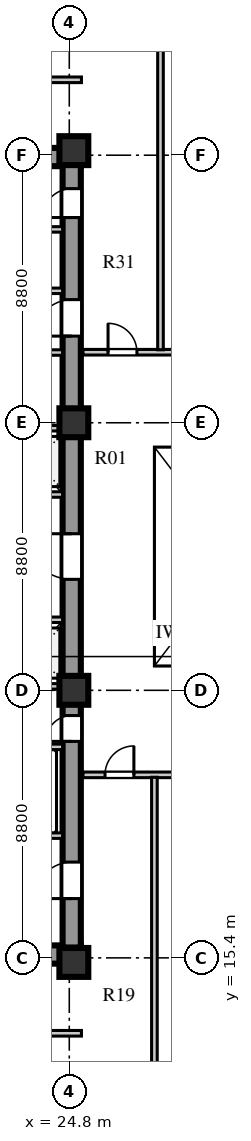
"""IFC4 building model, lengths in metres.
Left out: names, types, materials, properties, quantities, classifications, styles, units other than length and angle.
Written with IfcOpenShell. Run it as: python <this file> out.ifc"""

import sys

from ifc_helpers import new_model, si_unit, direction, frame, frame_2d, origin, origin_2d, place, context, subcontext, project, spatial, rectangle, extrude, element, fill, save


model = new_model("IFC4")
c1 = context("Model", 3, precision=1e-05, world=origin(), true_north=direction((0.0, 1.0)))
c2 = subcontext(c1, "Body", "Model", "MODEL_VIEW")
j1 = project(units=[si_unit("LENGTHUNIT", "METRE"), si_unit("PLANEANGLEUNIT", "RADIAN")], contexts=[c1])
p1 = place(None, origin())
s1 = spatial("IfcSite", under=j1, at=p1, CompositionType="ELEMENT")
p2 = place(p1, origin())
s2 = spatial("IfcBuilding", under=s1, at=p2, CompositionType="ELEMENT")
p3 = place(p2, frame((0.0, 0.0, 82.0)))
s3 = spatial("IfcBuildingStorey", under=s2, at=p3, CompositionType="ELEMENT", Elevation=82.0)
for number, where, z_axis, x_axis in (
    (1, (15.3, 15.51, 0.0), (0.0, 0.0, 1.0), (1.0, 0.0, 0.0)),
    (2, (15.3, 41.74, 0.0), (0.0, 0.0, 1.0), (1.0, 0.0, 0.0)),
):
    element("IfcWall", number, at=place(p3, frame(where, z_axis=z_axis, x_axis=x_axis)), inside=s3, PredefinedType="SHEAR", context=c2, shape_type="SweptSolid", body=[
        extrude(rectangle(XDim=9.88, YDim=0.6, at=frame_2d((4.94, 0.0))), origin(), (0.0, 0.0, 1.0), 3.74),
    ])
p4 = place(p3, frame((24.88, 15.74, 0.0), z_axis=(0.0, 0.0, 1.0), x_axis=(0.0, 1.0, 0.0)))
e3 = element("IfcWall", 3, at=p4, inside=s3, PredefinedType="SHEAR", context=c2, shape_type="SweptSolid", body=[
    extrude(rectangle(XDim=25.76, YDim=0.6, at=frame_2d((12.88, 0.0))), origin(), (0.0, 0.0, 1.0), 3.74),
])
p5 = place(p4, frame((1.61, 0.0, 0.0)))
e4 = element("IfcOpeningElement", 4, at=p5, cuts=e3, PredefinedType="OPENING", context=c2, shape_type="SweptSolid", body=[
    extrude(rectangle(XDim=1.2, YDim=2.1, at=frame_2d((0.6, 1.05))), frame((0.0, 0.31, 0.0), z_axis=(0.0, -1.0, 0.0), x_axis=(1.0, 0.0, 0.0)), (0.0, 0.0, 1.0), 0.62),
])
p6 = place(p4, frame((6.78, 0.0, 0.0)))
e5 = element("IfcOpeningElement", 5, at=p6, cuts=e3, PredefinedType="OPENING", context=c2, shape_type="SweptSolid", body=[
    extrude(rectangle(XDim=0.85, YDim=2.06, at=frame_2d((0.425, 1.03))), frame((0.0, 0.31, 0.0), z_axis=(0.0, -1.0, 0.0), x_axis=(1.0, 0.0, 0.0)), (0.0, 0.0, 1.0), 0.62),
])
p7 = place(p4, frame((12.11, 0.0, 0.0)))
e6 = element("IfcOpeningElement", 6, at=p7, cuts=e3, PredefinedType="OPENING", context=c2, shape_type="SweptSolid", body=[
    extrude(rectangle(XDim=1.5, YDim=2.12, at=frame_2d((0.75, 1.06))), frame((0.0, 0.31, 0.0), z_axis=(0.0, -1.0, 0.0), x_axis=(1.0, 0.0, 0.0)), (0.0, 0.0, 1.0), 0.62),
])
p8 = place(p4, frame((20.11, 0.0, 0.0)))
e7 = element("IfcOpeningElement", 7, at=p8, cuts=e3, PredefinedType="OPENING", context=c2, shape_type="SweptSolid", body=[
    extrude(rectangle(XDim=1.2, YDim=2.12, at=frame_2d((0.6, 1.06))), frame((0.0, 0.31, 0.0), z_axis=(0.0, -1.0, 0.0), x_axis=(1.0, 0.0, 0.0)), (0.0, 0.0, 1.0), 0.62),
])
p9 = place(p4, frame((24.01, 0.0, 0.0)))
e8 = element("IfcOpeningElement", 8, at=p9, cuts=e3, PredefinedType="OPENING", context=c2, shape_type="SweptSolid", body=[
    extrude(rectangle(XDim=0.95, YDim=2.1, at=frame_2d((0.475, 1.05))), frame((0.0, 0.31, 0.0), z_axis=(0.0, -1.0, 0.0), x_axis=(1.0, 0.0, 0.0)), (0.0, 0.0, 1.0), 0.62),
])
for number, where, z_axis, x_axis in (
    (9, (24.95, 15.25, 0.0), (0.0, 0.0, 1.0), (1.0, 0.0, 0.0)),
    (10, (24.95, 24.2, 0.0), (0.0, 0.0, 1.0), (1.0, 0.0, 0.0)),
    (11, (24.95, 33.0, 0.0), (0.0, 0.0, 1.0), (1.0, 0.0, 0.0)),
    (12, (24.95, 41.95, 0.0), (0.0, 0.0, 1.0), (1.0, 0.0, 0.0)),
):
    element("IfcColumn", number, at=place(p3, frame(where, z_axis=z_axis, x_axis=x_axis)), inside=s3, PredefinedType="COLUMN", context=c2, shape_type="SweptSolid", body=[
        extrude(rectangle(XDim=0.95, YDim=0.95, at=origin_2d()), origin(), (0.0, 0.0, 1.0), 3.74),
    ])
p10 = place(p3, frame((19.64, 19.42, 0.0), z_axis=(0.0, 0.0, 1.0), x_axis=(1.0, 0.0, 0.0)))
e13 = element("IfcWall", 13, at=p10, inside=s3, PredefinedType="SOLIDWALL", context=c2, shape_type="SweptSolid", body=[
    extrude(rectangle(XDim=4.94, YDim=0.18, at=frame_2d((2.47, 0.0))), origin(), (0.0, 0.0, 1.0), 3.74),
])
p11 = place(p10, frame((0.72, 0.0, 0.0)))
e14 = element("IfcOpeningElement", 14, at=p11, cuts=e13, PredefinedType="OPENING", context=c2, shape_type="SweptSolid", body=[
    extrude(rectangle(XDim=1.1, YDim=2.1, at=frame_2d((0.55, 1.05))), frame((0.0, 0.1, 0.0), z_axis=(0.0, -1.0, 0.0), x_axis=(1.0, 0.0, 0.0)), (0.0, 0.0, 1.0), 0.2),
])
p12 = place(p10, frame((3.02, 0.0, 0.0)))
e15 = element("IfcOpeningElement", 15, at=p12, cuts=e13, PredefinedType="OPENING", context=c2, shape_type="SweptSolid", body=[
    extrude(rectangle(XDim=1.1, YDim=2.1, at=frame_2d((0.55, 1.05))), frame((0.0, 0.1, 0.0), z_axis=(0.0, -1.0, 0.0), x_axis=(1.0, 0.0, 0.0)), (0.0, 0.0, 1.0), 0.2),
])
p13 = place(p3, frame((19.64, 22.34, 0.0), z_axis=(0.0, 0.0, 1.0), x_axis=(1.0, 0.0, 0.0)))
e16 = element("IfcWall", 16, at=p13, inside=s3, PredefinedType="SOLIDWALL", context=c2, shape_type="SweptSolid", body=[
    extrude(rectangle(XDim=4.94, YDim=0.18, at=frame_2d((2.47, 0.0))), origin(), (0.0, 0.0, 1.0), 3.74),
])
p14 = place(p3, frame((15.9, 26.52, 0.0), z_axis=(0.0, 0.0, 1.0), x_axis=(1.0, 0.0, 0.0)))
e17 = element("IfcWall", 17, at=p14, inside=s3, PredefinedType="SOLIDWALL", context=c2, shape_type="SweptSolid", body=[
    extrude(rectangle(XDim=8.68, YDim=0.18, at=frame_2d((4.34, 0.0))), origin(), (0.0, 0.0, 1.0), 3.74),
])
p15 = place(p14, frame((1.76, 0.0, 0.0)))
e18 = element("IfcOpeningElement", 18, at=p15, cuts=e17, PredefinedType="OPENING", context=c2, shape_type="SweptSolid", body=[
    extrude(rectangle(XDim=1.0, YDim=2.1, at=frame_2d((0.5, 1.05))), frame((0.0, 0.1, 0.0), z_axis=(0.0, -1.0, 0.0), x_axis=(1.0, 0.0, 0.0)), (0.0, 0.0, 1.0), 0.2),
])
p16 = place(p14, frame((3.6, 0.0, 0.0)))
e19 = element("IfcOpeningElement", 19, at=p16, cuts=e17, PredefinedType="OPENING", context=c2, shape_type="SweptSolid", body=[
    extrude(rectangle(XDim=1.0, YDim=2.1, at=frame_2d((0.5, 1.05))), frame((0.0, 0.1, 0.0), z_axis=(0.0, -1.0, 0.0), x_axis=(1.0, 0.0, 0.0)), (0.0, 0.0, 1.0), 0.2),
])
p17 = place(p14, frame((5.44, 0.0, 0.0)))
e20 = element("IfcOpeningElement", 20, at=p17, cuts=e17, PredefinedType="OPENING", context=c2, shape_type="SweptSolid", body=[
    extrude(rectangle(XDim=1.0, YDim=2.1, at=frame_2d((0.5, 1.05))), frame((0.0, 0.1, 0.0), z_axis=(0.0, -1.0, 0.0), x_axis=(1.0, 0.0, 0.0)), (0.0, 0.0, 1.0), 0.2),
])
p18 = place(p14, frame((7.28, 0.0, 0.0)))
e21 = element("IfcOpeningElement", 21, at=p18, cuts=e17, PredefinedType="OPENING", context=c2, shape_type="SweptSolid", body=[
    extrude(rectangle(XDim=1.0, YDim=2.1, at=frame_2d((0.5, 1.05))), frame((0.0, 0.1, 0.0), z_axis=(0.0, -1.0, 0.0), x_axis=(1.0, 0.0, 0.0)), (0.0, 0.0, 1.0), 0.2),
])
p19 = place(p3, frame((15.9, 24.33, 0.0), z_axis=(0.0, 0.0, 1.0), x_axis=(1.0, 0.0, 0.0)))
e22 = element("IfcWall", 22, at=p19, inside=s3, PredefinedType="SOLIDWALL", context=c2, shape_type="SweptSolid", body=[
    extrude(rectangle(XDim=8.68, YDim=0.18, at=frame_2d((4.34, 0.0))), origin(), (0.0, 0.0, 1.0), 3.04),
])
p20 = place(p3, frame((15.9, 30.64, 0.0), z_axis=(0.0, 0.0, 1.0), x_axis=(1.0, 0.0, 0.0)))
e23 = element("IfcWall", 23, at=p20, inside=s3, PredefinedType="SOLIDWALL", context=c2, shape_type="SweptSolid", body=[
    extrude(rectangle(XDim=8.68, YDim=0.18, at=frame_2d((4.34, 0.0))), origin(), (0.0, 0.0, 1.0), 3.74),
])
p21 = place(p20, frame((1.76, 0.0, 0.0)))
e24 = element("IfcOpeningElement", 24, at=p21, cuts=e23, PredefinedType="OPENING", context=c2, shape_type="SweptSolid", body=[
    extrude(rectangle(XDim=1.0, YDim=2.1, at=frame_2d((0.5, 1.05))), frame((0.0, 0.1, 0.0), z_axis=(0.0, -1.0, 0.0), x_axis=(1.0, 0.0, 0.0)), (0.0, 0.0, 1.0), 0.2),
])
p22 = place(p20, frame((3.6, 0.0, 0.0)))
e25 = element("IfcOpeningElement", 25, at=p22, cuts=e23, PredefinedType="OPENING", context=c2, shape_type="SweptSolid", body=[
    extrude(rectangle(XDim=1.0, YDim=2.1, at=frame_2d((0.5, 1.05))), frame((0.0, 0.1, 0.0), z_axis=(0.0, -1.0, 0.0), x_axis=(1.0, 0.0, 0.0)), (0.0, 0.0, 1.0), 0.2),
])
p23 = place(p20, frame((5.44, 0.0, 0.0)))
e26 = element("IfcOpeningElement", 26, at=p23, cuts=e23, PredefinedType="OPENING", context=c2, shape_type="SweptSolid", body=[
    extrude(rectangle(XDim=1.0, YDim=2.1, at=frame_2d((0.5, 1.05))), frame((0.0, 0.1, 0.0), z_axis=(0.0, -1.0, 0.0), x_axis=(1.0, 0.0, 0.0)), (0.0, 0.0, 1.0), 0.2),
])
p24 = place(p20, frame((7.28, 0.0, 0.0)))
e27 = element("IfcOpeningElement", 27, at=p24, cuts=e23, PredefinedType="OPENING", context=c2, shape_type="SweptSolid", body=[
    extrude(rectangle(XDim=1.0, YDim=2.1, at=frame_2d((0.5, 1.05))), frame((0.0, 0.1, 0.0), z_axis=(0.0, -1.0, 0.0), x_axis=(1.0, 0.0, 0.0)), (0.0, 0.0, 1.0), 0.2),
])
p25 = place(p3, frame((15.9, 32.82, 0.0), z_axis=(0.0, 0.0, 1.0), x_axis=(1.0, 0.0, 0.0)))
e28 = element("IfcWall", 28, at=p25, inside=s3, PredefinedType="SOLIDWALL", context=c2, shape_type="SweptSolid", body=[
    extrude(rectangle(XDim=8.68, YDim=0.18, at=frame_2d((4.34, 0.0))), origin(), (0.0, 0.0, 1.0), 3.04),
])
p26 = place(p3, frame((22.02, 35.31, 0.0), z_axis=(0.0, 0.0, 1.0), x_axis=(1.0, 0.0, 0.0)))
e29 = element("IfcWall", 29, at=p26, inside=s3, PredefinedType="SOLIDWALL", context=c2, shape_type="SweptSolid", body=[
    extrude(rectangle(XDim=2.56, YDim=0.18, at=frame_2d((1.28, 0.0))), origin(), (0.0, 0.0, 1.0), 3.74),
])
p27 = place(p26, frame((0.55, 0.0, 0.0)))
e30 = element("IfcOpeningElement", 30, at=p27, cuts=e29, PredefinedType="OPENING", context=c2, shape_type="SweptSolid", body=[
    extrude(rectangle(XDim=1.0, YDim=2.1, at=frame_2d((0.5, 1.05))), frame((0.0, 0.1, 0.0), z_axis=(0.0, -1.0, 0.0), x_axis=(1.0, 0.0, 0.0)), (0.0, 0.0, 1.0), 0.2),
])
p28 = place(p3, frame((19.64, 37.34, 0.0), z_axis=(0.0, 0.0, 1.0), x_axis=(1.0, 0.0, 0.0)))
e31 = element("IfcWall", 31, at=p28, inside=s3, PredefinedType="SOLIDWALL", context=c2, shape_type="SweptSolid", body=[
    extrude(rectangle(XDim=4.94, YDim=0.18, at=frame_2d((2.47, 0.0))), origin(), (0.0, 0.0, 1.0), 3.74),
])
p29 = place(p28, frame((0.45, 0.0, 0.0)))
e32 = element("IfcOpeningElement", 32, at=p29, cuts=e31, PredefinedType="OPENING", context=c2, shape_type="SweptSolid", body=[
    extrude(rectangle(XDim=1.0, YDim=2.1, at=frame_2d((0.5, 1.05))), frame((0.0, 0.1, 0.0), z_axis=(0.0, -1.0, 0.0), x_axis=(1.0, 0.0, 0.0)), (0.0, 0.0, 1.0), 0.2),
])
p30 = place(p28, frame((2.5, 0.0, 0.0)))
e33 = element("IfcOpeningElement", 33, at=p30, cuts=e31, PredefinedType="OPENING", context=c2, shape_type="SweptSolid", body=[
    extrude(rectangle(XDim=1.0, YDim=2.1, at=frame_2d((0.5, 1.05))), frame((0.0, 0.1, 0.0), z_axis=(0.0, -1.0, 0.0), x_axis=(1.0, 0.0, 0.0)), (0.0, 0.0, 1.0), 0.2),
])
p31 = place(p3, frame((19.64, 39.36, 0.0), z_axis=(0.0, 0.0, 1.0), x_axis=(1.0, 0.0, 0.0)))
e34 = element("IfcWall", 34, at=p31, inside=s3, PredefinedType="SOLIDWALL", context=c2, shape_type="SweptSolid", body=[
    extrude(rectangle(XDim=4.94, YDim=0.18, at=frame_2d((2.47, 0.0))), origin(), (0.0, 0.0, 1.0), 3.74),
])
p32 = place(p3, frame((25.25, 21.42, 0.0), z_axis=(0.0, 0.0, 1.0), x_axis=(1.0, 0.0, 0.0)))
e35 = element("IfcWall", 35, at=p32, inside=s3, PredefinedType="SOLIDWALL", context=c2, shape_type="SweptSolid", body=[
    extrude(rectangle(XDim=12.87, YDim=0.185, at=frame_2d((6.435, 0.0))), origin(), (0.0, 0.0, 1.0), 3.34),
])
p33 = place(p32, frame((0.725, 0.0, 0.0)))
e36 = element("IfcOpeningElement", 36, at=p33, cuts=e35, PredefinedType="OPENING", context=c2, shape_type="SweptSolid", body=[
    extrude(rectangle(XDim=0.95, YDim=2.08, at=frame_2d((0.475, 1.04))), frame((0.0, 0.103, 0.0), z_axis=(0.0, -1.0, 0.0), x_axis=(1.0, 0.0, 0.0)), (0.0, 0.0, 1.0), 0.205),
])
p34 = place(p32, frame((3.025, 0.0, 0.0)))
e37 = element("IfcOpeningElement", 37, at=p34, cuts=e35, PredefinedType="OPENING", context=c2, shape_type="SweptSolid", body=[
    extrude(rectangle(XDim=0.95, YDim=2.08, at=frame_2d((0.475, 1.04))), frame((0.0, 0.103, 0.0), z_axis=(0.0, -1.0, 0.0), x_axis=(1.0, 0.0, 0.0)), (0.0, 0.0, 1.0), 0.205),
])
p35 = place(p32, frame((5.325, 0.0, 0.0)))
e38 = element("IfcOpeningElement", 38, at=p35, cuts=e35, PredefinedType="OPENING", context=c2, shape_type="SweptSolid", body=[
    extrude(rectangle(XDim=0.95, YDim=2.08, at=frame_2d((0.475, 1.04))), frame((0.0, 0.103, 0.0), z_axis=(0.0, -1.0, 0.0), x_axis=(1.0, 0.0, 0.0)), (0.0, 0.0, 1.0), 0.205),
])
p36 = place(p32, frame((7.625, 0.0, 0.0)))
e39 = element("IfcOpeningElement", 39, at=p36, cuts=e35, PredefinedType="OPENING", context=c2, shape_type="SweptSolid", body=[
    extrude(rectangle(XDim=0.95, YDim=2.08, at=frame_2d((0.475, 1.04))), frame((0.0, 0.103, 0.0), z_axis=(0.0, -1.0, 0.0), x_axis=(1.0, 0.0, 0.0)), (0.0, 0.0, 1.0), 0.205),
])
p37 = place(p32, frame((9.725, 0.0, 0.0)))
e40 = element("IfcOpeningElement", 40, at=p37, cuts=e35, PredefinedType="OPENING", context=c2, shape_type="SweptSolid", body=[
    extrude(rectangle(XDim=0.95, YDim=2.08, at=frame_2d((0.475, 1.04))), frame((0.0, 0.103, 0.0), z_axis=(0.0, -1.0, 0.0), x_axis=(1.0, 0.0, 0.0)), (0.0, 0.0, 1.0), 0.205),
])
p38 = place(p32, frame((11.495, 0.0, 0.0)))
e41 = element("IfcOpeningElement", 41, at=p38, cuts=e35, PredefinedType="OPENING", context=c2, shape_type="SweptSolid", body=[
    extrude(rectangle(XDim=0.95, YDim=2.08, at=frame_2d((0.475, 1.04))), frame((0.0, 0.103, 0.0), z_axis=(0.0, -1.0, 0.0), x_axis=(1.0, 0.0, 0.0)), (0.0, 0.0, 1.0), 0.205),
])
p39 = place(p3, frame((25.25, 35.32, 0.0), z_axis=(0.0, 0.0, 1.0), x_axis=(1.0, 0.0, 0.0)))
e42 = element("IfcWall", 42, at=p39, inside=s3, PredefinedType="SOLIDWALL", context=c2, shape_type="SweptSolid", body=[
    extrude(rectangle(XDim=9.47, YDim=0.185, at=frame_2d((4.735, 0.0))), origin(), (0.0, 0.0, 1.0), 3.74),
])
p40 = place(p39, frame((0.825, 0.0, 0.0)))
e43 = element("IfcOpeningElement", 43, at=p40, cuts=e42, PredefinedType="OPENING", context=c2, shape_type="SweptSolid", body=[
    extrude(rectangle(XDim=0.95, YDim=2.08, at=frame_2d((0.475, 1.04))), frame((0.0, 0.103, 0.0), z_axis=(0.0, -1.0, 0.0), x_axis=(1.0, 0.0, 0.0)), (0.0, 0.0, 1.0), 0.205),
])
p41 = place(p39, frame((3.775, 0.0, 0.0)))
e44 = element("IfcOpeningElement", 44, at=p41, cuts=e42, PredefinedType="OPENING", context=c2, shape_type="SweptSolid", body=[
    extrude(rectangle(XDim=0.95, YDim=2.08, at=frame_2d((0.475, 1.04))), frame((0.0, 0.103, 0.0), z_axis=(0.0, -1.0, 0.0), x_axis=(1.0, 0.0, 0.0)), (0.0, 0.0, 1.0), 0.205),
])
p42 = place(p39, frame((7.215, 0.0, 0.0)))
e45 = element("IfcOpeningElement", 45, at=p42, cuts=e42, PredefinedType="OPENING", context=c2, shape_type="SweptSolid", body=[
    extrude(rectangle(XDim=0.95, YDim=2.08, at=frame_2d((0.475, 1.04))), frame((0.0, 0.103, 0.0), z_axis=(0.0, -1.0, 0.0), x_axis=(1.0, 0.0, 0.0)), (0.0, 0.0, 1.0), 0.205),
])
p43 = place(p3, frame((10.5, 12.92, 0.0), z_axis=(0.0, 0.0, 1.0), x_axis=(1.0, 0.0, 0.0)))
e46 = element("IfcWall", 46, at=p43, inside=s3, PredefinedType="SOLIDWALL", context=c2, shape_type="SweptSolid", body=[
    extrude(rectangle(XDim=14.7, YDim=0.185, at=frame_2d((7.35, 0.0))), origin(), (0.0, 0.0, 1.0), 3.74),
])
p44 = place(p43, frame((6.2, 0.0, 0.0)))
e47 = element("IfcOpeningElement", 47, at=p44, cuts=e46, PredefinedType="OPENING", context=c2, shape_type="SweptSolid", body=[
    extrude(rectangle(XDim=1.0, YDim=2.08, at=frame_2d((0.5, 1.04))), frame((0.0, 0.103, 0.0), z_axis=(0.0, -1.0, 0.0), x_axis=(1.0, 0.0, 0.0)), (0.0, 0.0, 1.0), 0.205),
])
p45 = place(p3, frame((10.5, 44.28, 0.0), z_axis=(0.0, 0.0, 1.0), x_axis=(1.0, 0.0, 0.0)))
e48 = element("IfcWall", 48, at=p45, inside=s3, PredefinedType="SOLIDWALL", context=c2, shape_type="SweptSolid", body=[
    extrude(rectangle(XDim=14.7, YDim=0.185, at=frame_2d((7.35, 0.0))), origin(), (0.0, 0.0, 1.0), 3.74),
])
p46 = place(p45, frame((6.2, 0.0, 0.0)))
e49 = element("IfcOpeningElement", 49, at=p46, cuts=e48, PredefinedType="OPENING", context=c2, shape_type="SweptSolid", body=[
    extrude(rectangle(XDim=1.0, YDim=2.08, at=frame_2d((0.5, 1.04))), frame((0.0, 0.103, 0.0), z_axis=(0.0, -1.0, 0.0), x_axis=(1.0, 0.0, 0.0)), (0.0, 0.0, 1.0), 0.205),
])
p47 = place(p3, frame((27.6, 8.48, 0.0), z_axis=(0.0, 0.0, 1.0), x_axis=(0.0, 1.0, 0.0)))
e50 = element("IfcWall", 50, at=p47, inside=s3, PredefinedType="SOLIDWALL", context=c2, shape_type="SweptSolid", body=[
    extrude(rectangle(XDim=12.86, YDim=0.185, at=frame_2d((6.43, 0.0))), origin(), (0.0, 0.0, 1.0), 3.74),
])
p48 = place(p3, frame((27.8, 35.4, 0.0), z_axis=(0.0, 0.0, 1.0), x_axis=(0.0, 1.0, 0.0)))
e51 = element("IfcWall", 51, at=p48, inside=s3, PredefinedType="SOLIDWALL", context=c2, shape_type="SweptSolid", body=[
    extrude(rectangle(XDim=13.32, YDim=0.185, at=frame_2d((6.66, 0.0))), origin(), (0.0, 0.0, 1.0), 3.74),
])
p49 = place(p5, frame((1.2, 0.0, 0.0), z_axis=(0.0, 0.0, 1.0), x_axis=(-1.0, 0.0, 0.0)))
e52 = element("IfcDoor", 52, at=p49, inside=s3, OperationType="SINGLE_SWING_RIGHT", PredefinedType="DOOR", context=c2, shape_type="SweptSolid", body=[
    extrude(rectangle(XDim=1.2, YDim=2.1, at=frame_2d((0.6, 1.05))), frame((0.0, 0.025, 0.0), z_axis=(0.0, -1.0, 0.0), x_axis=(1.0, 0.0, 0.0)), (0.0, 0.0, 1.0), 0.05),
])
fill(e4, e52)
p50 = place(p6, frame((0.85, 0.0, 0.0), z_axis=(0.0, 0.0, 1.0), x_axis=(-1.0, 0.0, 0.0)))
e53 = element("IfcDoor", 53, at=p50, inside=s3, OperationType="SINGLE_SWING_RIGHT", PredefinedType="DOOR", context=c2, shape_type="SweptSolid", body=[
    extrude(rectangle(XDim=0.85, YDim=2.06, at=frame_2d((0.425, 1.03))), frame((0.0, 0.025, 0.0), z_axis=(0.0, -1.0, 0.0), x_axis=(1.0, 0.0, 0.0)), (0.0, 0.0, 1.0), 0.05),
])
fill(e5, e53)
p51 = place(p7, frame((1.5, 0.0, 0.0), z_axis=(0.0, 0.0, 1.0), x_axis=(-1.0, 0.0, 0.0)))
e54 = element("IfcDoor", 54, at=p51, inside=s3, OperationType="SINGLE_SWING_LEFT", PredefinedType="DOOR", context=c2, shape_type="SweptSolid", body=[
    extrude(rectangle(XDim=1.5, YDim=2.12, at=frame_2d((0.75, 1.06))), frame((0.0, 0.025, 0.0), z_axis=(0.0, -1.0, 0.0), x_axis=(1.0, 0.0, 0.0)), (0.0, 0.0, 1.0), 0.05),
])
fill(e6, e54)
p52 = place(p8, frame((1.2, 0.0, 0.0), z_axis=(0.0, 0.0, 1.0), x_axis=(-1.0, 0.0, 0.0)))
e55 = element("IfcDoor", 55, at=p52, inside=s3, OperationType="SINGLE_SWING_RIGHT", PredefinedType="DOOR", context=c2, shape_type="SweptSolid", body=[
    extrude(rectangle(XDim=1.2, YDim=2.12, at=frame_2d((0.6, 1.06))), frame((0.0, 0.025, 0.0), z_axis=(0.0, -1.0, 0.0), x_axis=(1.0, 0.0, 0.0)), (0.0, 0.0, 1.0), 0.05),
])
fill(e7, e55)
p53 = place(p9, frame((0.95, 0.0, 0.0), z_axis=(0.0, 0.0, 1.0), x_axis=(-1.0, 0.0, 0.0)))
e56 = element("IfcDoor", 56, at=p53, inside=s3, OperationType="SINGLE_SWING_RIGHT", PredefinedType="DOOR", context=c2, shape_type="SweptSolid", body=[
    extrude(rectangle(XDim=0.95, YDim=2.1, at=frame_2d((0.475, 1.05))), frame((0.0, 0.025, 0.0), z_axis=(0.0, -1.0, 0.0), x_axis=(1.0, 0.0, 0.0)), (0.0, 0.0, 1.0), 0.05),
])
fill(e8, e56)
p54 = place(p33, frame((0.95, 0.0, 0.0), z_axis=(0.0, 0.0, 1.0), x_axis=(-1.0, 0.0, 0.0)))
e57 = element("IfcDoor", 57, at=p54, inside=s3, OperationType="SINGLE_SWING_LEFT", PredefinedType="DOOR", context=c2, shape_type="SweptSolid", body=[
    extrude(rectangle(XDim=0.95, YDim=2.08, at=frame_2d((0.475, 1.04))), frame((0.0, 0.025, 0.0), z_axis=(0.0, -1.0, 0.0), x_axis=(1.0, 0.0, 0.0)), (0.0, 0.0, 1.0), 0.05),
])
fill(e36, e57)
p55 = place(p40, origin())
e58 = element("IfcDoor", 58, at=p55, inside=s3, OperationType="SINGLE_SWING_LEFT", PredefinedType="DOOR", context=c2, shape_type="SweptSolid", body=[
    extrude(rectangle(XDim=0.95, YDim=2.08, at=frame_2d((0.475, 1.04))), frame((0.0, 0.025, 0.0), z_axis=(0.0, -1.0, 0.0), x_axis=(1.0, 0.0, 0.0)), (0.0, 0.0, 1.0), 0.05),
])
fill(e43, e58)
save(model, sys.argv[1])
